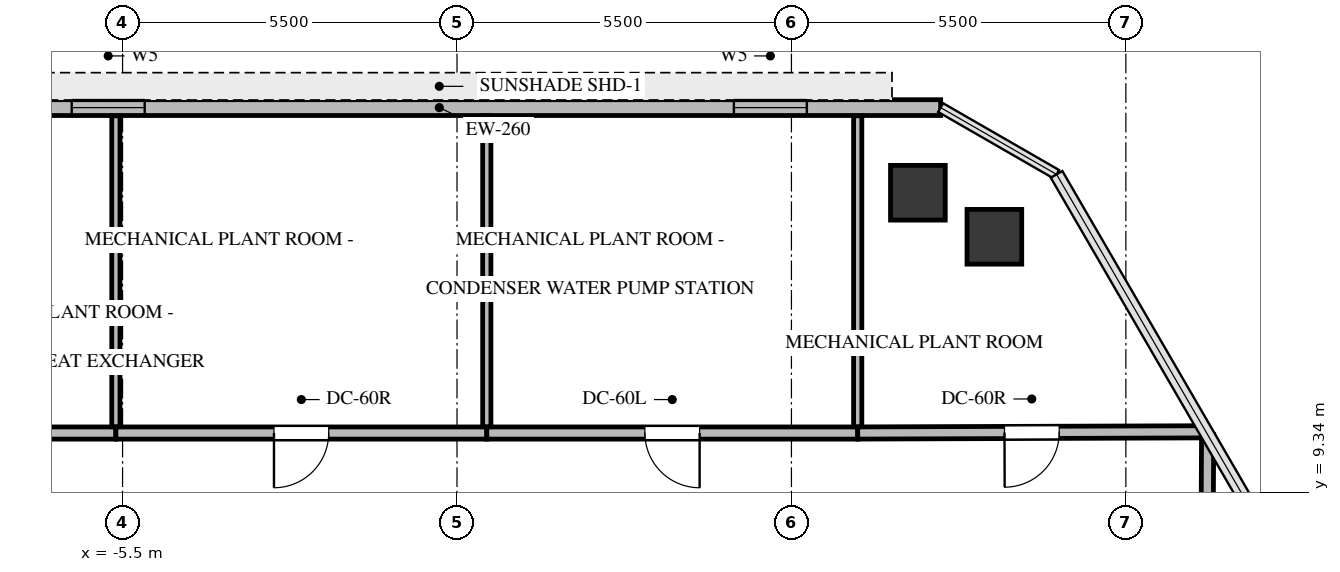
"""IFC4 building model, lengths in metres.
Left out: names, types, materials, properties, quantities, classifications, styles, units other than length and angle.
Written with IfcOpenShell. Run it as: python <this file> out.ifc"""

import sys

from ifc_helpers import new_model, si_unit, direction, frame, frame_2d, origin, origin_2d, place, context, subcontext, project, spatial, rectangle, extrude, source, transform, mapped, element, fill, save


model = new_model("IFC4")
c1 = context("Model", 3, precision=1e-05, world=origin(), true_north=direction((0.0, 1.0)))
c2 = subcontext(c1, "Body", "Model", "MODEL_VIEW")
j1 = project(units=[si_unit("LENGTHUNIT", "METRE"), si_unit("PLANEANGLEUNIT", "RADIAN")], contexts=[c1])
p1 = place(None, origin())
s1 = spatial("IfcSite", under=j1, at=p1, CompositionType="ELEMENT")
p2 = place(p1, origin())
s2 = spatial("IfcBuilding", under=s1, at=p2, CompositionType="ELEMENT")
p3 = place(p2, frame((0.0, 0.0, 268.3)))
s3 = spatial("IfcBuildingStorey", under=s2, at=p3, CompositionType="ELEMENT", Elevation=268.3)
m1 = source(origin(), c2, "Body", "SweptSolid", [
    extrude(rectangle(XDim=0.9, YDim=0.9, at=origin_2d()), origin(), (0.0, 0.0, 1.0), 4.05),
])
for number, where, z_axis, x_axis in (
    (1, (7.58, 14.262, -0.3), (0.0, 0.0, 1.0), (1.0, 0.0, 0.0)),
    (2, (8.837, 13.538, -0.3), (0.0, 0.0, 1.0), (1.0, 0.0, 0.0)),
):
    element("IfcColumn", number, at=place(p3, frame(where, z_axis=z_axis, x_axis=x_axis)), inside=s3, PredefinedType="COLUMN", context=c2, shape_type="MappedRepresentation", body=[
        mapped(m1, transform((0.0, 0.0, 0.0), x_axis=(1.0, 0.0, 0.0), y_axis=(0.0, 1.0, 0.0), z_axis=(0.0, 0.0, 1.0), scale=1.0)),
    ])
p4 = place(p3, frame((-8.536, 15.662, 0.0), z_axis=(0.0, 0.0, 1.0), x_axis=(1.0, 0.0, 0.0)))
e3 = element("IfcWall", 3, at=p4, inside=s3, PredefinedType="SOLIDWALL", context=c2, shape_type="SweptSolid", body=[
    extrude(rectangle(XDim=16.49, YDim=0.26, at=frame_2d((8.245, 0.0))), origin(), (0.0, 0.0, 1.0), 3.75),
])
p5 = place(p4, frame((2.2, 0.0, 0.9)))
e4 = element("IfcOpeningElement", 4, at=p5, cuts=e3, PredefinedType="OPENING", context=c2, shape_type="SweptSolid", body=[
    extrude(rectangle(XDim=1.2, YDim=1.5, at=frame_2d((0.6, 0.75))), frame((0.0, 0.14, 0.0), z_axis=(0.0, -1.0, 0.0), x_axis=(1.0, 0.0, 0.0)), (0.0, 0.0, 1.0), 0.28),
])
p6 = place(p4, frame((13.09, 0.0, 0.9)))
e5 = element("IfcOpeningElement", 5, at=p6, cuts=e3, PredefinedType="OPENING", context=c2, shape_type="SweptSolid", body=[
    extrude(rectangle(XDim=1.2, YDim=1.5, at=frame_2d((0.6, 0.75))), frame((0.0, 0.14, 0.0), z_axis=(0.0, -1.0, 0.0), x_axis=(1.0, 0.0, 0.0)), (0.0, 0.0, 1.0), 0.28),
])
p7 = place(p3, frame((-5.61, 10.31, 0.0), z_axis=(0.0, 0.0, 1.0), x_axis=(-1.0, 0.0, 0.0)))
e6 = element("IfcWall", 6, at=p7, inside=s3, PredefinedType="SOLIDWALL", context=c2, shape_type="SweptSolid", body=[
    extrude(rectangle(XDim=6.78, YDim=0.2, at=frame_2d((3.39, 0.0))), origin(), (0.0, 0.0, 1.0), 2.32),
])
p8 = place(p7, frame((2.94, 0.0, 0.0)))
e7 = element("IfcOpeningElement", 7, at=p8, cuts=e6, PredefinedType="OPENING", context=c2, shape_type="SweptSolid", body=[
    extrude(rectangle(XDim=0.9, YDim=2.05, at=frame_2d((0.45, 1.025))), frame((0.0, 0.11, 0.0), z_axis=(0.0, -1.0, 0.0), x_axis=(1.0, 0.0, 0.0)), (0.0, 0.0, 1.0), 0.22),
])
p9 = place(p3, frame((0.49, 10.31, 0.0), z_axis=(0.0, 0.0, 1.0), x_axis=(-1.0, 0.0, 0.0)))
e8 = element("IfcWall", 8, at=p9, inside=s3, PredefinedType="SOLIDWALL", context=c2, shape_type="SweptSolid", body=[
    extrude(rectangle(XDim=6.1, YDim=0.2, at=frame_2d((3.05, 0.0))), origin(), (0.0, 0.0, 1.0), 2.32),
])
p10 = place(p9, frame((2.6, 0.0, 0.0)))
e9 = element("IfcOpeningElement", 9, at=p10, cuts=e8, PredefinedType="OPENING", context=c2, shape_type="SweptSolid", body=[
    extrude(rectangle(XDim=0.9, YDim=2.05, at=frame_2d((0.45, 1.025))), frame((0.0, 0.11, 0.0), z_axis=(0.0, -1.0, 0.0), x_axis=(1.0, 0.0, 0.0)), (0.0, 0.0, 1.0), 0.22),
])
p11 = place(p3, frame((6.59, 10.31, 0.0), z_axis=(0.0, 0.0, 1.0), x_axis=(-1.0, 0.0, 0.0)))
e10 = element("IfcWall", 10, at=p11, inside=s3, PredefinedType="SOLIDWALL", context=c2, shape_type="SweptSolid", body=[
    extrude(rectangle(XDim=6.1, YDim=0.2, at=frame_2d((3.05, 0.0))), origin(), (0.0, 0.0, 1.0), 2.32),
])
p12 = place(p11, frame((2.6, 0.0, 0.0)))
e11 = element("IfcOpeningElement", 11, at=p12, cuts=e10, PredefinedType="OPENING", context=c2, shape_type="SweptSolid", body=[
    extrude(rectangle(XDim=0.9, YDim=2.05, at=frame_2d((0.45, 1.025))), frame((0.0, 0.11, 0.0), z_axis=(0.0, -1.0, 0.0), x_axis=(1.0, 0.0, 0.0)), (0.0, 0.0, 1.0), 0.22),
])
p13 = place(p3, frame((12.318, 10.33, 0.0), z_axis=(0.0, 0.0, 1.0), x_axis=(-0.999994039535, -0.003452664842, 0.0)))
e12 = element("IfcWall", 12, at=p13, inside=s3, PredefinedType="SOLIDWALL", context=c2, shape_type="SweptSolid", body=[
    extrude(rectangle(XDim=5.728, YDim=0.2, at=frame_2d((2.864, 0.0))), origin(), (0.0, 0.0, 1.0), 2.32),
])
p14 = place(p13, frame((2.414, 0.0, 0.0)))
e13 = element("IfcOpeningElement", 13, at=p14, cuts=e12, PredefinedType="OPENING", context=c2, shape_type="SweptSolid", body=[
    extrude(rectangle(XDim=0.9, YDim=2.05, at=frame_2d((0.45, 1.025))), frame((0.0, 0.11, 0.0), z_axis=(0.0, -1.0, 0.0), x_axis=(1.0, 0.0, 0.0)), (0.0, 0.0, 1.0), 0.22),
])
p15 = place(p3, frame((12.31, 3.49, 0.0), z_axis=(0.0, 0.0, 1.0), x_axis=(0.005031021246, 0.999987344333, 0.0)))
e14 = element("IfcWall", 14, at=p15, inside=s3, PredefinedType="SOLIDWALL", context=c2, shape_type="SweptSolid", body=[
    extrude(rectangle(XDim=6.794, YDim=0.2, at=frame_2d((3.397, 0.0))), origin(), (0.0, 0.0, 1.0), 2.32),
])
p16 = place(p15, frame((2.947, 0.0, 0.0)))
e15 = element("IfcOpeningElement", 15, at=p16, cuts=e14, PredefinedType="OPENING", context=c2, shape_type="SweptSolid", body=[
    extrude(rectangle(XDim=0.9, YDim=2.05, at=frame_2d((0.45, 1.025))), frame((0.0, 0.11, 0.0), z_axis=(0.0, -1.0, 0.0), x_axis=(1.0, 0.0, 0.0)), (0.0, 0.0, 1.0), 0.22),
])
for number, where, z_axis, x_axis in (
    (16, (-5.61, 15.527, 0.0), (0.0, 0.0, 1.0), (0.0, -1.0, 0.0)),
    (17, (0.49, 15.527, 0.0), (0.0, 0.0, 1.0), (0.0, -1.0, 0.0)),
):
    element("IfcWall", number, at=place(p3, frame(where, z_axis=z_axis, x_axis=x_axis)), inside=s3, PredefinedType="PARTITIONING", context=c2, shape_type="SweptSolid", body=[
        extrude(rectangle(XDim=5.113, YDim=0.135, at=frame_2d((2.557, 0.0))), origin(), (0.0, 0.0, 1.0), 2.32),
    ])
p17 = place(p3, frame((6.59, 15.527, 0.0), z_axis=(0.0, 0.0, 1.0), x_axis=(0.0, -1.0, 0.0)))
e18 = element("IfcWall", 18, at=p17, inside=s3, PredefinedType="PARTITIONING", context=c2, shape_type="SweptSolid", body=[
    extrude(rectangle(XDim=5.113, YDim=0.135, at=frame_2d((2.556, 0.0))), origin(), (0.0, 0.0, 1.0), 2.32),
])
m2 = source(origin(), c2, "Body", "SweptSolid", [
    extrude(rectangle(XDim=1.2, YDim=1.5, at=frame_2d((0.6, 0.75))), frame((0.0, 0.03, 0.0), z_axis=(0.0, -1.0, 0.0), x_axis=(1.0, 0.0, 0.0)), (0.0, 0.0, 1.0), 0.06),
])
p18 = place(p5, origin())
e19 = element("IfcWindow", 19, at=p18, inside=s3, PartitioningType="SINGLE_PANEL", PredefinedType="WINDOW", context=c2, shape_type="MappedRepresentation", body=[
    mapped(m2, transform((0.0, 0.0, 0.0), x_axis=(1.0, 0.0, 0.0), y_axis=(0.0, 1.0, 0.0), z_axis=(0.0, 0.0, 1.0), scale=1.0)),
])
fill(e4, e19)
p19 = place(p6, origin())
e20 = element("IfcWindow", 20, at=p19, inside=s3, PartitioningType="SINGLE_PANEL", PredefinedType="WINDOW", context=c2, shape_type="MappedRepresentation", body=[
    mapped(m2, transform((0.0, 0.0, 0.0), x_axis=(1.0, 0.0, 0.0), y_axis=(0.0, 1.0, 0.0), z_axis=(0.0, 0.0, 1.0), scale=1.0)),
])
fill(e5, e20)
m3 = source(origin(), c2, "Body", "SweptSolid", [
    extrude(rectangle(XDim=0.9, YDim=2.05, at=frame_2d((0.45, 1.025))), frame((0.0, 0.025, 0.0), z_axis=(0.0, -1.0, 0.0), x_axis=(1.0, 0.0, 0.0)), (0.0, 0.0, 1.0), 0.05),
])
p20 = place(p10, origin())
e21 = element("IfcDoor", 21, at=p20, inside=s3, OperationType="SINGLE_SWING_RIGHT", PredefinedType="DOOR", context=c2, shape_type="MappedRepresentation", body=[
    mapped(m3, transform((0.0, 0.0, 0.0), x_axis=(1.0, 0.0, 0.0), y_axis=(0.0, 1.0, 0.0), z_axis=(0.0, 0.0, 1.0), scale=1.0)),
])
fill(e9, e21)
m4 = source(origin(), c2, "Body", "SweptSolid", [
    extrude(rectangle(XDim=0.9, YDim=2.05, at=frame_2d((0.45, 1.025))), frame((0.0, 0.025, 0.0), z_axis=(0.0, -1.0, 0.0), x_axis=(1.0, 0.0, 0.0)), (0.0, 0.0, 1.0), 0.05),
])
p21 = place(p12, origin())
e22 = element("IfcDoor", 22, at=p21, inside=s3, OperationType="SINGLE_SWING_LEFT", PredefinedType="DOOR", context=c2, shape_type="MappedRepresentation", body=[
    mapped(m4, transform((0.0, 0.0, 0.0), x_axis=(1.0, 0.0, 0.0), y_axis=(0.0, 1.0, 0.0), z_axis=(0.0, 0.0, 1.0), scale=1.0)),
])
fill(e11, e22)
p22 = place(p14, origin())
e23 = element("IfcDoor", 23, at=p22, inside=s3, OperationType="SINGLE_SWING_RIGHT", PredefinedType="DOOR", context=c2, shape_type="MappedRepresentation", body=[
    mapped(m3, transform((0.0, 0.0, 0.0), x_axis=(1.0, 0.0, 0.0), y_axis=(0.0, 1.0, 0.0), z_axis=(0.0, 0.0, 1.0), scale=1.0)),
])
fill(e13, e23)
save(model, sys.argv[1])
